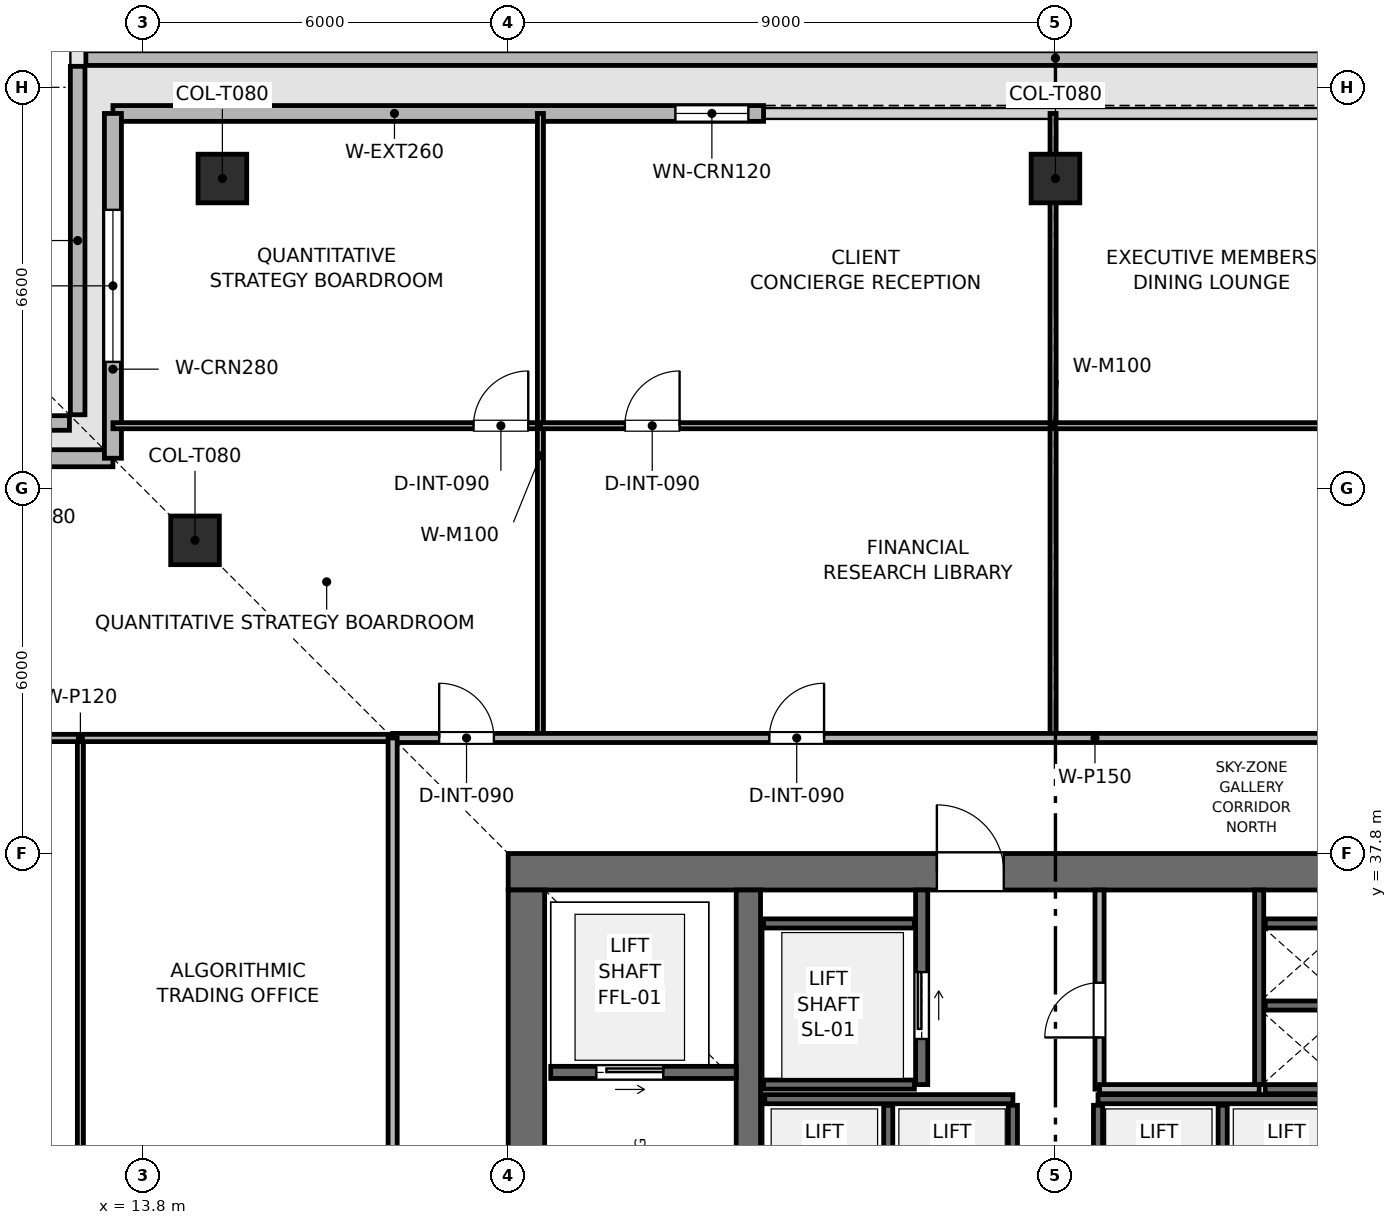
"""IFC4 building model, lengths in metres.
Left out: names, types, materials, properties, quantities, classifications, styles, units other than length and angle.
Written with IfcOpenShell. Run it as: python <this file> out.ifc"""

import sys

from ifc_helpers import new_model, si_unit, direction, frame, frame_2d, origin, origin_2d, place, context, subcontext, project, spatial, rectangle, extrude, element, fill, save


model = new_model("IFC4")
c1 = context("Model", 3, precision=1e-05, world=origin(), true_north=direction((0.0, 1.0)))
c2 = subcontext(c1, "Body", "Model", "MODEL_VIEW")
j1 = project(units=[si_unit("LENGTHUNIT", "METRE"), si_unit("PLANEANGLEUNIT", "RADIAN")], contexts=[c1])
p1 = place(None, origin())
s1 = spatial("IfcSite", under=j1, at=p1, CompositionType="ELEMENT")
p2 = place(p1, origin())
s2 = spatial("IfcBuilding", under=s1, at=p2, CompositionType="ELEMENT")
p3 = place(p2, frame((0.0, 0.0, 344.25)))
s3 = spatial("IfcBuildingStorey", under=s2, at=p3, CompositionType="ELEMENT", Elevation=344.25)
p4 = place(p3, frame((19.8, 37.5, 0.0), z_axis=(0.0, 0.0, 1.0), x_axis=(1.0, 0.0, 0.0)))
e1 = element("IfcWall", 1, at=p4, inside=s3, PredefinedType="SHEAR", context=c2, shape_type="SweptSolid", body=[
    extrude(rectangle(XDim=18.0, YDim=0.6, at=frame_2d((9.0, 0.0))), origin(), (0.0, 0.0, 1.0), 3.75),
])
p5 = place(p4, frame((7.05, 0.0, 0.0)))
e2 = element("IfcOpeningElement", 2, at=p5, cuts=e1, PredefinedType="OPENING", context=c2, shape_type="SweptSolid", body=[
    extrude(rectangle(XDim=1.1, YDim=2.15, at=frame_2d((0.55, 1.075))), frame((0.0, 0.31, 0.0), z_axis=(0.0, -1.0, 0.0), x_axis=(1.0, 0.0, 0.0)), (0.0, 0.0, 1.0), 0.62),
])
p6 = place(p3, frame((20.1, 20.4, 0.0), z_axis=(0.0, 0.0, 1.0), x_axis=(0.0, 1.0, 0.0)))
e3 = element("IfcWall", 3, at=p6, inside=s3, PredefinedType="SHEAR", context=c2, shape_type="SweptSolid", body=[
    extrude(rectangle(XDim=16.8, YDim=0.6, at=frame_2d((8.4, 0.0))), origin(), (0.0, 0.0, 1.0), 3.75),
])
p7 = place(p6, frame((10.4, 0.0, 0.0)))
e4 = element("IfcOpeningElement", 4, at=p7, cuts=e3, PredefinedType="OPENING", context=c2, shape_type="SweptSolid", body=[
    extrude(rectangle(XDim=1.1, YDim=2.15, at=frame_2d((0.55, 1.075))), frame((0.0, 0.31, 0.0), z_axis=(0.0, -1.0, 0.0), x_axis=(1.0, 0.0, 0.0)), (0.0, 0.0, 1.0), 0.62),
])
p8 = place(p3, frame((23.75, 20.4, 0.0), z_axis=(0.0, 0.0, 1.0), x_axis=(0.0, 1.0, 0.0)))
e5 = element("IfcWall", 5, at=p8, inside=s3, PredefinedType="SHEAR", context=c2, shape_type="SweptSolid", body=[
    extrude(rectangle(XDim=16.8, YDim=0.4, at=frame_2d((8.4, 0.0))), origin(), (0.0, 0.0, 1.0), 3.75),
])
for number, where, z_axis, x_axis in (
    (6, (28.8, 48.9, 0.003), (0.0, 0.0, 1.0), (1.0, 0.0, 0.0)),
    (7, (15.1, 48.9, 0.003), (0.0, 0.0, 1.0), (1.0, 0.0, 0.0)),
    (8, (14.65, 42.95, 0.003), (0.0, 0.0, 1.0), (1.0, 0.0, 0.0)),
):
    element("IfcColumn", number, at=place(p3, frame(where, z_axis=z_axis, x_axis=x_axis)), inside=s3, PredefinedType="COLUMN", context=c2, shape_type="SweptSolid", body=[
        extrude(rectangle(XDim=0.8, YDim=0.8, at=origin_2d()), origin(), (0.0, 0.0, 1.0), 3.504),
    ])
p9 = place(p3, frame((44.745, 50.88, 0.0), z_axis=(0.0, 0.0, 1.0), x_axis=(-1.0, 0.0, 0.0)))
e9 = element("IfcWall", 9, at=p9, inside=s3, PredefinedType="PARAPET", context=c2, shape_type="SweptSolid", body=[
    extrude(rectangle(XDim=31.89, YDim=0.24, at=frame_2d((15.945, 0.0))), origin(), (0.0, 0.0, 1.0), 1.2),
])
p10 = place(p3, frame((12.72, 50.745, 0.0), z_axis=(0.0, 0.0, 1.0), x_axis=(0.0, -1.0, 0.0)))
e10 = element("IfcWall", 10, at=p10, inside=s3, PredefinedType="PARAPET", context=c2, shape_type="SweptSolid", body=[
    extrude(rectangle(XDim=5.73, YDim=0.24, at=frame_2d((2.865, 0.0))), origin(), (0.0, 0.0, 1.0), 1.2),
])
p11 = place(p3, frame((12.585, 44.88, 0.0), z_axis=(0.0, 0.0, 1.0), x_axis=(-1.0, 0.0, 0.0)))
e11 = element("IfcWall", 11, at=p11, inside=s3, PredefinedType="PARAPET", context=c2, shape_type="SweptSolid", body=[
    extrude(rectangle(XDim=5.73, YDim=0.24, at=frame_2d((2.865, 0.0))), origin(), (0.0, 0.0, 1.0), 1.2),
])
p12 = place(p3, frame((13.3, 49.97, 0.0), z_axis=(0.0, 0.0, 1.0), x_axis=(1.0, 0.0, 0.0)))
e12 = element("IfcWall", 12, at=p12, inside=s3, PredefinedType="SOLIDWALL", context=c2, shape_type="SweptSolid", body=[
    extrude(rectangle(XDim=10.7, YDim=0.26, at=frame_2d((5.35, 0.0))), origin(), (0.0, 0.0, 1.0), 3.51),
])
p13 = place(p12, frame((9.25, 0.0, 0.9)))
e13 = element("IfcOpeningElement", 13, at=p13, cuts=e12, PredefinedType="OPENING", context=c2, shape_type="SweptSolid", body=[
    extrude(rectangle(XDim=1.2, YDim=2.1, at=frame_2d((0.6, 1.05))), frame((0.0, 0.14, 0.0), z_axis=(0.0, -1.0, 0.0), x_axis=(1.0, 0.0, 0.0)), (0.0, 0.0, 1.0), 0.28),
])
p14 = place(p3, frame((7.63, 44.3, 0.0), z_axis=(0.0, 0.0, 1.0), x_axis=(1.0, 0.0, 0.0)))
e14 = element("IfcWall", 14, at=p14, inside=s3, PredefinedType="SOLIDWALL", context=c2, shape_type="SweptSolid", body=[
    extrude(rectangle(XDim=5.67, YDim=0.28, at=frame_2d((2.835, 0.0))), origin(), (0.0, 0.0, 1.0), 3.51),
])
p15 = place(p14, frame((1.585, 0.0, 0.9)))
e15 = element("IfcOpeningElement", 15, at=p15, cuts=e14, PredefinedType="OPENING", context=c2, shape_type="SweptSolid", body=[
    extrude(rectangle(XDim=2.5, YDim=1.9, at=frame_2d((1.25, 0.95))), frame((0.0, 0.15, 0.0), z_axis=(0.0, -1.0, 0.0), x_axis=(1.0, 0.0, 0.0)), (0.0, 0.0, 1.0), 0.3),
])
p16 = place(p3, frame((13.3, 44.3, 0.0), z_axis=(0.0, 0.0, 1.0), x_axis=(0.0, 1.0, 0.0)))
e16 = element("IfcWall", 16, at=p16, inside=s3, PredefinedType="SOLIDWALL", context=c2, shape_type="SweptSolid", body=[
    extrude(rectangle(XDim=5.67, YDim=0.28, at=frame_2d((2.835, 0.0))), origin(), (0.0, 0.0, 1.0), 3.51),
])
p17 = place(p16, frame((1.585, 0.0, 0.9)))
e17 = element("IfcOpeningElement", 17, at=p17, cuts=e16, PredefinedType="OPENING", context=c2, shape_type="SweptSolid", body=[
    extrude(rectangle(XDim=2.5, YDim=1.9, at=frame_2d((1.25, 0.95))), frame((0.0, 0.15, 0.0), z_axis=(0.0, -1.0, 0.0), x_axis=(1.0, 0.0, 0.0)), (0.0, 0.0, 1.0), 0.3),
])
p18 = place(p3, frame((32.15, 34.0, 0.0), z_axis=(0.0, 0.0, 1.0), x_axis=(0.0, 1.0, 0.0)))
e18 = element("IfcWall", 18, at=p18, inside=s3, PredefinedType="SHEAR", context=c2, shape_type="SweptSolid", body=[
    extrude(rectangle(XDim=3.2, YDim=0.15, at=frame_2d((1.6, 0.0))), origin(), (0.0, 0.0, 1.0), 3.51),
])
for number, where, z_axis, x_axis in (
    (19, (32.25, 33.925, 0.0), (0.0, 0.0, 1.0), (1.0, 0.0, 0.0)),
    (20, (32.25, 35.3, 0.0), (0.0, 0.0, 1.0), (1.0, 0.0, 0.0)),
):
    element("IfcWall", number, at=place(p3, frame(where, z_axis=z_axis, x_axis=x_axis)), inside=s3, PredefinedType="SHEAR", context=c2, shape_type="SweptSolid", body=[
        extrude(rectangle(XDim=1.33, YDim=0.15, at=frame_2d((0.665, 0.0))), origin(), (0.0, 0.0, 1.0), 3.51),
    ])
p19 = place(p3, frame((20.5, 34.2, 0.0), z_axis=(0.0, 0.0, 1.0), x_axis=(1.0, 0.0, 0.0)))
e21 = element("IfcWall", 21, at=p19, inside=s3, PredefinedType="SHEAR", context=c2, shape_type="SweptSolid", body=[
    extrude(rectangle(XDim=3.05, YDim=0.2, at=frame_2d((1.525, 0.0))), origin(), (0.0, 0.0, 1.0), 3.51),
])
p20 = place(p19, frame((0.75, 0.0, 0.0)))
e22 = element("IfcOpeningElement", 22, at=p20, cuts=e21, PredefinedType="OPENING", context=c2, shape_type="SweptSolid", body=[
    extrude(rectangle(XDim=1.1, YDim=2.15, at=frame_2d((0.55, 1.075))), frame((0.0, 0.11, 0.0), z_axis=(0.0, -1.0, 0.0), x_axis=(1.0, 0.0, 0.0)), (0.0, 0.0, 1.0), 0.22),
])
p21 = place(p3, frame((26.6, 34.0, 0.0), z_axis=(0.0, 0.0, 1.0), x_axis=(0.0, 1.0, 0.0)))
e23 = element("IfcWall", 23, at=p21, inside=s3, PredefinedType="SHEAR", context=c2, shape_type="SweptSolid", body=[
    extrude(rectangle(XDim=3.2, YDim=0.2, at=frame_2d((1.6, 0.0))), origin(), (0.0, 0.0, 1.0), 3.51),
])
p22 = place(p21, frame((0.75, 0.0, 0.0)))
e24 = element("IfcOpeningElement", 24, at=p22, cuts=e23, PredefinedType="OPENING", context=c2, shape_type="SweptSolid", body=[
    extrude(rectangle(XDim=1.1, YDim=2.15, at=frame_2d((0.55, 1.075))), frame((0.0, 0.11, 0.0), z_axis=(0.0, -1.0, 0.0), x_axis=(1.0, 0.0, 0.0)), (0.0, 0.0, 1.0), 0.22),
])
for number, where, z_axis, x_axis in (
    (25, (24.0, 34.0, 0.0), (0.0, 0.0, 1.0), (1.0, 0.0, 0.0)),
    (26, (24.0, 36.65, 0.0), (0.0, 0.0, 1.0), (1.0, 0.0, 0.0)),
):
    element("IfcWall", number, at=place(p3, frame(where, z_axis=z_axis, x_axis=x_axis)), inside=s3, PredefinedType="SHEAR", context=c2, shape_type="SweptSolid", body=[
        extrude(rectangle(XDim=2.48, YDim=0.15, at=frame_2d((1.24, 0.0))), origin(), (0.0, 0.0, 1.0), 3.51),
    ])
p23 = place(p3, frame((32.25, 36.65, 0.0), z_axis=(0.0, 0.0, 1.0), x_axis=(1.0, 0.0, 0.0)))
e27 = element("IfcWall", 27, at=p23, inside=s3, PredefinedType="SHEAR", context=c2, shape_type="SweptSolid", body=[
    extrude(rectangle(XDim=1.33, YDim=0.15, at=frame_2d((0.665, 0.0))), origin(), (0.0, 0.0, 1.0), 3.51),
])
for number, where, z_axis, x_axis in (
    (28, (24.02, 33.76, 0.0), (0.0, 0.0, 1.0), (1.0, 0.0, 0.0)),
    (29, (29.5, 33.76, 0.0), (0.0, 0.0, 1.0), (1.0, 0.0, 0.0)),
):
    element("IfcWall", number, at=place(p3, frame(where, z_axis=z_axis, x_axis=x_axis)), inside=s3, PredefinedType="SHEAR", context=c2, shape_type="SweptSolid", body=[
        extrude(rectangle(XDim=4.08, YDim=0.15, at=frame_2d((2.04, 0.0))), origin(), (0.0, 0.0, 1.0), 3.51),
    ])
for number, where, z_axis, x_axis in (
    (30, (26.05, 31.42, 0.0), (0.0, 0.0, 1.0), (0.0, 1.0, 0.0)),
    (31, (28.1, 31.42, 0.0), (0.0, 0.0, 1.0), (0.0, 1.0, 0.0)),
    (32, (29.5, 31.42, 0.0), (0.0, 0.0, 1.0), (0.0, 1.0, 0.0)),
    (33, (31.55, 31.42, 0.0), (0.0, 0.0, 1.0), (0.0, 1.0, 0.0)),
):
    element("IfcWall", number, at=place(p3, frame(where, z_axis=z_axis, x_axis=x_axis)), inside=s3, PredefinedType="SHEAR", context=c2, shape_type="SweptSolid", body=[
        extrude(rectangle(XDim=2.24, YDim=0.15, at=frame_2d((1.12, 0.0))), origin(), (0.0, 0.0, 1.0), 3.51),
    ])
p24 = place(p3, frame((29.525, 33.925, 0.0), z_axis=(0.0, 0.0, 1.0), x_axis=(0.0, 1.0, 0.0)))
e34 = element("IfcWall", 34, at=p24, inside=s3, PredefinedType="PARTITIONING", context=c2, shape_type="SweptSolid", body=[
    extrude(rectangle(XDim=3.275, YDim=0.15, at=frame_2d((1.637, 0.0))), origin(), (0.0, 0.0, 1.0), 3.51),
])
p25 = place(p24, frame((0.85, 0.0, 0.0)))
e35 = element("IfcOpeningElement", 35, at=p25, cuts=e34, PredefinedType="OPENING", context=c2, shape_type="SweptSolid", body=[
    extrude(rectangle(XDim=0.9, YDim=2.1, at=frame_2d((0.45, 1.05))), frame((0.0, 0.085, 0.0), z_axis=(0.0, -1.0, 0.0), x_axis=(1.0, 0.0, 0.0)), (0.0, 0.0, 1.0), 0.17),
])
p26 = place(p3, frame((29.525, 33.925, 0.0), z_axis=(0.0, 0.0, 1.0), x_axis=(1.0, 0.0, 0.0)))
e36 = element("IfcWall", 36, at=p26, inside=s3, PredefinedType="PARTITIONING", context=c2, shape_type="SweptSolid", body=[
    extrude(rectangle(XDim=2.625, YDim=0.15, at=frame_2d((1.312, 0.0))), origin(), (0.0, 0.0, 1.0), 3.51),
])
p27 = place(p3, frame((13.3, 44.835, 0.0), z_axis=(0.0, 0.0, 1.0), x_axis=(1.0, 0.0, 0.0)))
e37 = element("IfcWall", 37, at=p27, inside=s3, PredefinedType="MOVABLE", context=c2, shape_type="SweptSolid", body=[
    extrude(rectangle(XDim=7.03, YDim=0.1, at=frame_2d((3.515, 0.0))), origin(), (0.0, 0.0, 1.0), 3.095),
])
p28 = place(p27, frame((5.93, 0.0, 0.0)))
e38 = element("IfcOpeningElement", 38, at=p28, cuts=e37, PredefinedType="OPENING", context=c2, shape_type="SweptSolid", body=[
    extrude(rectangle(XDim=0.9, YDim=2.1, at=frame_2d((0.45, 1.05))), frame((0.0, 0.06, 0.0), z_axis=(0.0, -1.0, 0.0), x_axis=(1.0, 0.0, 0.0)), (0.0, 0.0, 1.0), 0.12),
])
p29 = place(p3, frame((20.33, 39.7, 0.0), z_axis=(0.0, 0.0, 1.0), x_axis=(0.0, 1.0, 0.0)))
e39 = element("IfcWall", 39, at=p29, inside=s3, PredefinedType="MOVABLE", context=c2, shape_type="SweptSolid", body=[
    extrude(rectangle(XDim=10.27, YDim=0.1, at=frame_2d((5.135, 0.0))), origin(), (0.0, 0.0, 1.0), 3.095),
])
p30 = place(p3, frame((20.33, 44.835, 0.0), z_axis=(0.0, 0.0, 1.0), x_axis=(1.0, 0.0, 0.0)))
e40 = element("IfcWall", 40, at=p30, inside=s3, PredefinedType="MOVABLE", context=c2, shape_type="SweptSolid", body=[
    extrude(rectangle(XDim=8.431, YDim=0.1, at=frame_2d((4.215, 0.0))), origin(), (0.0, 0.0, 1.0), 3.095),
])
p31 = place(p30, frame((1.389, 0.0, 0.0)))
e41 = element("IfcOpeningElement", 41, at=p31, cuts=e40, PredefinedType="OPENING", context=c2, shape_type="SweptSolid", body=[
    extrude(rectangle(XDim=0.9, YDim=2.1, at=frame_2d((0.45, 1.05))), frame((0.0, 0.06, 0.0), z_axis=(0.0, -1.0, 0.0), x_axis=(1.0, 0.0, 0.0)), (0.0, 0.0, 1.0), 0.12),
])
p32 = place(p3, frame((28.761, 39.7, 0.0), z_axis=(0.0, 0.0, 1.0), x_axis=(0.0, 1.0, 0.0)))
e42 = element("IfcWall", 42, at=p32, inside=s3, PredefinedType="MOVABLE", context=c2, shape_type="SweptSolid", body=[
    extrude(rectangle(XDim=10.27, YDim=0.1, at=frame_2d((5.135, 0.0))), origin(), (0.0, 0.0, 1.0), 2.995),
])
p33 = place(p3, frame((28.761, 44.835, 0.0), z_axis=(0.0, 0.0, 1.0), x_axis=(1.0, 0.0, 0.0)))
e43 = element("IfcWall", 43, at=p33, inside=s3, PredefinedType="MOVABLE", context=c2, shape_type="SweptSolid", body=[
    extrude(rectangle(XDim=15.539, YDim=0.1, at=frame_2d((7.77, 0.0))), origin(), (0.0, 0.0, 1.0), 3.095),
])
p34 = place(p33, frame((6.133, 0.0, 0.0)))
e44 = element("IfcOpeningElement", 44, at=p34, cuts=e43, PredefinedType="OPENING", context=c2, shape_type="SweptSolid", body=[
    extrude(rectangle(XDim=0.9, YDim=2.1, at=frame_2d((0.45, 1.05))), frame((0.0, 0.06, 0.0), z_axis=(0.0, -1.0, 0.0), x_axis=(1.0, 0.0, 0.0)), (0.0, 0.0, 1.0), 0.12),
])
p35 = place(p3, frame((12.765, 13.3, 0.0), z_axis=(0.0, 0.0, 1.0), x_axis=(0.0, 1.0, 0.0)))
e45 = element("IfcWall", 45, at=p35, inside=s3, PredefinedType="MOVABLE", context=c2, shape_type="SweptSolid", body=[
    extrude(rectangle(XDim=26.4, YDim=0.1, at=frame_2d((13.2, 0.0))), origin(), (0.0, 0.0, 1.0), 3.095),
])
p36 = place(p35, frame((8.567, 0.0, 0.0)))
e46 = element("IfcOpeningElement", 46, at=p36, cuts=e45, PredefinedType="OPENING", context=c2, shape_type="SweptSolid", body=[
    extrude(rectangle(XDim=0.9, YDim=2.1, at=frame_2d((0.45, 1.05))), frame((0.0, 0.06, 0.0), z_axis=(0.0, -1.0, 0.0), x_axis=(1.0, 0.0, 0.0)), (0.0, 0.0, 1.0), 0.12),
])
p37 = place(p3, frame((7.63, 39.7, 0.0), z_axis=(0.0, 0.0, 1.0), x_axis=(1.0, 0.0, 0.0)))
e47 = element("IfcWall", 47, at=p37, inside=s3, PredefinedType="PARTITIONING", context=c2, shape_type="SweptSolid", body=[
    extrude(rectangle(XDim=10.27, YDim=0.12, at=frame_2d((5.135, 0.0))), origin(), (0.0, 0.0, 1.0), 3.095),
])
p38 = place(p3, frame((17.9, 39.7, 0.0), z_axis=(0.0, 0.0, 1.0), x_axis=(1.0, 0.0, 0.0)))
e48 = element("IfcWall", 48, at=p38, inside=s3, PredefinedType="PARTITIONING", context=c2, shape_type="SweptSolid", body=[
    extrude(rectangle(XDim=21.8, YDim=0.15, at=frame_2d((10.9, 0.0))), origin(), (0.0, 0.0, 1.0), 3.095),
])
p39 = place(p38, frame((0.765, 0.0, 0.0)))
e49 = element("IfcOpeningElement", 49, at=p39, cuts=e48, PredefinedType="OPENING", context=c2, shape_type="SweptSolid", body=[
    extrude(rectangle(XDim=0.9, YDim=2.1, at=frame_2d((0.45, 1.05))), frame((0.0, 0.085, 0.0), z_axis=(0.0, -1.0, 0.0), x_axis=(1.0, 0.0, 0.0)), (0.0, 0.0, 1.0), 0.17),
])
p40 = place(p38, frame((6.195, 0.0, 0.0)))
e50 = element("IfcOpeningElement", 50, at=p40, cuts=e48, PredefinedType="OPENING", context=c2, shape_type="SweptSolid", body=[
    extrude(rectangle(XDim=0.9, YDim=2.1, at=frame_2d((0.45, 1.05))), frame((0.0, 0.085, 0.0), z_axis=(0.0, -1.0, 0.0), x_axis=(1.0, 0.0, 0.0)), (0.0, 0.0, 1.0), 0.17),
])
p41 = place(p38, frame((15.88, 0.0, 0.0)))
e51 = element("IfcOpeningElement", 51, at=p41, cuts=e48, PredefinedType="OPENING", context=c2, shape_type="SweptSolid", body=[
    extrude(rectangle(XDim=0.9, YDim=2.1, at=frame_2d((0.45, 1.05))), frame((0.0, 0.085, 0.0), z_axis=(0.0, -1.0, 0.0), x_axis=(1.0, 0.0, 0.0)), (0.0, 0.0, 1.0), 0.17),
])
p42 = place(p3, frame((17.9, 13.3, 0.0), z_axis=(0.0, 0.0, 1.0), x_axis=(0.0, 1.0, 0.0)))
e52 = element("IfcWall", 52, at=p42, inside=s3, PredefinedType="PARTITIONING", context=c2, shape_type="SweptSolid", body=[
    extrude(rectangle(XDim=26.4, YDim=0.15, at=frame_2d((13.2, 0.0))), origin(), (0.0, 0.0, 1.0), 3.095),
])
p43 = place(p42, frame((12.75, 0.0, 0.0)))
e53 = element("IfcOpeningElement", 53, at=p43, cuts=e52, PredefinedType="OPENING", context=c2, shape_type="SweptSolid", body=[
    extrude(rectangle(XDim=0.9, YDim=2.1, at=frame_2d((0.45, 1.05))), frame((0.0, 0.085, 0.0), z_axis=(0.0, -1.0, 0.0), x_axis=(1.0, 0.0, 0.0)), (0.0, 0.0, 1.0), 0.17),
])
p44 = place(p13, origin())
e54 = element("IfcWindow", 54, at=p44, inside=s3, PartitioningType="SINGLE_PANEL", PredefinedType="WINDOW", context=c2, shape_type="SweptSolid", body=[
    extrude(rectangle(XDim=1.2, YDim=2.1, at=frame_2d((0.6, 1.05))), frame((0.0, 0.03, 0.0), z_axis=(0.0, -1.0, 0.0), x_axis=(1.0, 0.0, 0.0)), (0.0, 0.0, 1.0), 0.06),
])
fill(e13, e54)
p45 = place(p17, origin())
e55 = element("IfcWindow", 55, at=p45, inside=s3, PartitioningType="SINGLE_PANEL", PredefinedType="WINDOW", context=c2, shape_type="SweptSolid", body=[
    extrude(rectangle(XDim=2.5, YDim=1.9, at=frame_2d((1.25, 0.95))), frame((0.0, 0.03, 0.0), z_axis=(0.0, -1.0, 0.0), x_axis=(1.0, 0.0, 0.0)), (0.0, 0.0, 1.0), 0.06),
])
fill(e17, e55)
p46 = place(p20, origin())
e56 = element("IfcDoor", 56, at=p46, inside=s3, OperationType="SLIDING_TO_RIGHT", PredefinedType="DOOR", context=c2, shape_type="SweptSolid", body=[
    extrude(rectangle(XDim=1.1, YDim=2.15, at=frame_2d((0.55, 1.075))), frame((0.0, 0.025, 0.0), z_axis=(0.0, -1.0, 0.0), x_axis=(1.0, 0.0, 0.0)), (0.0, 0.0, 1.0), 0.05),
])
fill(e22, e56)
p47 = place(p22, origin())
e57 = element("IfcDoor", 57, at=p47, inside=s3, OperationType="SLIDING_TO_RIGHT", PredefinedType="DOOR", context=c2, shape_type="SweptSolid", body=[
    extrude(rectangle(XDim=1.1, YDim=2.15, at=frame_2d((0.55, 1.075))), frame((0.0, 0.025, 0.0), z_axis=(0.0, -1.0, 0.0), x_axis=(1.0, 0.0, 0.0)), (0.0, 0.0, 1.0), 0.05),
])
fill(e24, e57)
p48 = place(p25, origin())
e58 = element("IfcDoor", 58, at=p48, inside=s3, OperationType="SINGLE_SWING_LEFT", PredefinedType="DOOR", context=c2, shape_type="SweptSolid", body=[
    extrude(rectangle(XDim=0.9, YDim=2.1, at=frame_2d((0.45, 1.05))), frame((0.0, 0.025, 0.0), z_axis=(0.0, -1.0, 0.0), x_axis=(1.0, 0.0, 0.0)), (0.0, 0.0, 1.0), 0.05),
])
fill(e35, e58)
p49 = place(p28, origin())
e59 = element("IfcDoor", 59, at=p49, inside=s3, OperationType="SINGLE_SWING_RIGHT", PredefinedType="DOOR", context=c2, shape_type="SweptSolid", body=[
    extrude(rectangle(XDim=0.9, YDim=2.1, at=frame_2d((0.45, 1.05))), frame((0.0, 0.025, 0.0), z_axis=(0.0, -1.0, 0.0), x_axis=(1.0, 0.0, 0.0)), (0.0, 0.0, 1.0), 0.05),
])
fill(e38, e59)
p50 = place(p31, origin())
e60 = element("IfcDoor", 60, at=p50, inside=s3, OperationType="SINGLE_SWING_RIGHT", PredefinedType="DOOR", context=c2, shape_type="SweptSolid", body=[
    extrude(rectangle(XDim=0.9, YDim=2.1, at=frame_2d((0.45, 1.05))), frame((0.0, 0.025, 0.0), z_axis=(0.0, -1.0, 0.0), x_axis=(1.0, 0.0, 0.0)), (0.0, 0.0, 1.0), 0.05),
])
fill(e41, e60)
p51 = place(p39, origin())
e61 = element("IfcDoor", 61, at=p51, inside=s3, OperationType="SINGLE_SWING_LEFT", PredefinedType="DOOR", context=c2, shape_type="SweptSolid", body=[
    extrude(rectangle(XDim=0.9, YDim=2.1, at=frame_2d((0.45, 1.05))), frame((0.0, 0.025, 0.0), z_axis=(0.0, -1.0, 0.0), x_axis=(1.0, 0.0, 0.0)), (0.0, 0.0, 1.0), 0.05),
])
fill(e49, e61)
p52 = place(p40, origin())
e62 = element("IfcDoor", 62, at=p52, inside=s3, OperationType="SINGLE_SWING_RIGHT", PredefinedType="DOOR", context=c2, shape_type="SweptSolid", body=[
    extrude(rectangle(XDim=0.9, YDim=2.1, at=frame_2d((0.45, 1.05))), frame((0.0, 0.025, 0.0), z_axis=(0.0, -1.0, 0.0), x_axis=(1.0, 0.0, 0.0)), (0.0, 0.0, 1.0), 0.05),
])
fill(e50, e62)
p53 = place(p5, origin())
e63 = element("IfcDoor", 63, at=p53, inside=s3, OperationType="SINGLE_SWING_LEFT", PredefinedType="DOOR", context=c2, shape_type="SweptSolid", body=[
    extrude(rectangle(XDim=1.1, YDim=2.15, at=frame_2d((0.55, 1.075))), frame((0.0, 0.025, 0.0), z_axis=(0.0, -1.0, 0.0), x_axis=(1.0, 0.0, 0.0)), (0.0, 0.0, 1.0), 0.05),
])
fill(e2, e63)
save(model, sys.argv[1])
